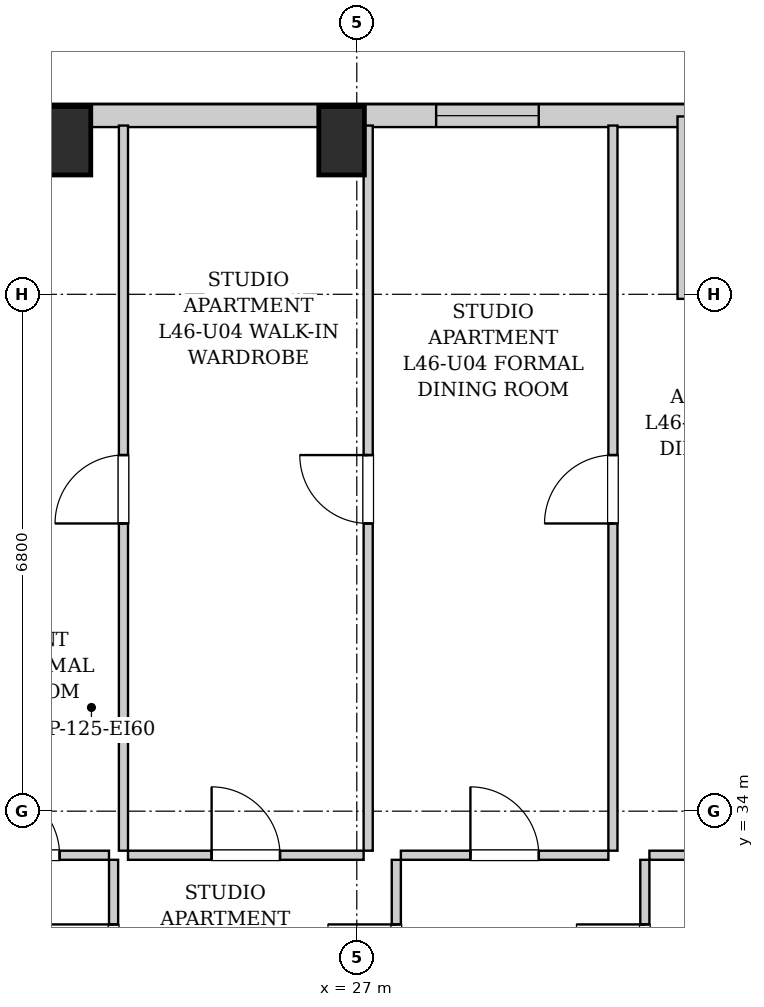
"""IFC4 building model, lengths in metres.
Left out: names, types, materials, properties, quantities, classifications, styles, units other than length and angle.
Written with IfcOpenShell. Run it as: python <this file> out.ifc"""

import sys

from ifc_helpers import new_model, si_unit, direction, frame, frame_2d, origin, origin_2d, place, context, subcontext, project, spatial, rectangle, extrude, element, fill, save


model = new_model("IFC4")
c1 = context("Model", 3, precision=1e-05, world=origin(), true_north=direction((0.0, 1.0)))
c2 = subcontext(c1, "Body", "Model", "MODEL_VIEW")
j1 = project(units=[si_unit("LENGTHUNIT", "METRE"), si_unit("PLANEANGLEUNIT", "RADIAN")], contexts=[c1])
p1 = place(None, origin())
s1 = spatial("IfcSite", under=j1, at=p1, CompositionType="ELEMENT")
p2 = place(p1, origin())
s2 = spatial("IfcBuilding", under=s1, at=p2, CompositionType="ELEMENT")
p3 = place(p2, frame((0.0, 0.0, 160.15)))
s3 = spatial("IfcBuildingStorey", under=s2, at=p3, CompositionType="ELEMENT", Elevation=160.15)
for number, where, z_axis, x_axis in (
    (1, (23.2, 42.82, 0.0), (0.0, 0.0, 1.0), (1.0, 0.0, 0.0)),
    (2, (26.8, 42.82, 0.0), (0.0, 0.0, 1.0), (1.0, 0.0, 0.0)),
):
    element("IfcColumn", number, at=place(p3, frame(where, z_axis=z_axis, x_axis=x_axis)), inside=s3, PredefinedType="COLUMN", context=c2, shape_type="SweptSolid", body=[
        extrude(rectangle(XDim=0.6, YDim=0.9, at=origin_2d()), origin(), (0.0, 0.0, 1.0), 3.25),
    ])
p4 = place(p3, frame((10.0, 43.15, 0.0), z_axis=(0.0, 0.0, 1.0), x_axis=(1.0, 0.0, 0.0)))
e3 = element("IfcWall", 3, at=p4, inside=s3, PredefinedType="SOLIDWALL", context=c2, shape_type="SweptSolid", body=[
    extrude(rectangle(XDim=21.35, YDim=0.3, at=frame_2d((10.675, 0.0))), origin(), (0.0, 0.0, 1.0), 2.99),
])
p5 = place(p4, frame((1.956, 0.0, 0.55)))
e4 = element("IfcOpeningElement", 4, at=p5, cuts=e3, PredefinedType="OPENING", context=c2, shape_type="SweptSolid", body=[
    extrude(rectangle(XDim=1.35, YDim=1.2, at=frame_2d((0.675, 0.6))), frame((0.0, 0.16, 0.0), z_axis=(0.0, -1.0, 0.0), x_axis=(1.0, 0.0, 0.0)), (0.0, 0.0, 1.0), 0.32),
])
p6 = place(p4, frame((5.189, 0.0, 0.55)))
e5 = element("IfcOpeningElement", 5, at=p6, cuts=e3, PredefinedType="OPENING", context=c2, shape_type="SweptSolid", body=[
    extrude(rectangle(XDim=1.35, YDim=1.2, at=frame_2d((0.675, 0.6))), frame((0.0, 0.16, 0.0), z_axis=(0.0, -1.0, 0.0), x_axis=(1.0, 0.0, 0.0)), (0.0, 0.0, 1.0), 0.32),
])
p7 = place(p4, frame((8.421, 0.0, 0.55)))
e6 = element("IfcOpeningElement", 6, at=p7, cuts=e3, PredefinedType="OPENING", context=c2, shape_type="SweptSolid", body=[
    extrude(rectangle(XDim=1.35, YDim=1.2, at=frame_2d((0.675, 0.6))), frame((0.0, 0.16, 0.0), z_axis=(0.0, -1.0, 0.0), x_axis=(1.0, 0.0, 0.0)), (0.0, 0.0, 1.0), 0.32),
])
p8 = place(p4, frame((11.15, 0.0, 0.55)))
e7 = element("IfcOpeningElement", 7, at=p8, cuts=e3, PredefinedType="OPENING", context=c2, shape_type="SweptSolid", body=[
    extrude(rectangle(XDim=1.35, YDim=1.2, at=frame_2d((0.675, 0.6))), frame((0.0, 0.16, 0.0), z_axis=(0.0, -1.0, 0.0), x_axis=(1.0, 0.0, 0.0)), (0.0, 0.0, 1.0), 0.32),
])
p9 = place(p4, frame((18.044, 0.0, 0.55)))
e8 = element("IfcOpeningElement", 8, at=p9, cuts=e3, PredefinedType="OPENING", context=c2, shape_type="SweptSolid", body=[
    extrude(rectangle(XDim=1.35, YDim=1.2, at=frame_2d((0.675, 0.6))), frame((0.0, 0.16, 0.0), z_axis=(0.0, -1.0, 0.0), x_axis=(1.0, 0.0, 0.0)), (0.0, 0.0, 1.0), 0.32),
])
p10 = place(p3, frame((31.35, 43.14, 0.0), z_axis=(0.0, 0.0, 1.0), x_axis=(0.0, -1.0, 0.0)))
e9 = element("IfcWall", 9, at=p10, inside=s3, PredefinedType="SOLIDWALL", context=c2, shape_type="SweptSolid", body=[
    extrude(rectangle(XDim=2.4, YDim=0.26, at=frame_2d((1.2, 0.0))), origin(), (0.0, 0.0, 1.0), 2.99),
])
p11 = place(p3, frame((23.8, 30.76, 0.0), z_axis=(0.0, 0.0, 1.0), x_axis=(0.0, 1.0, 0.0)))
e10 = element("IfcWall", 10, at=p11, inside=s3, PredefinedType="PARTITIONING", context=c2, shape_type="SweptSolid", body=[
    extrude(rectangle(XDim=2.6, YDim=0.12, at=frame_2d((1.3, 0.0))), origin(), (0.0, 0.0, 1.0), 2.99),
])
p12 = place(p11, frame((0.85, 0.0, 0.0)))
e11 = element("IfcOpeningElement", 11, at=p12, cuts=e10, PredefinedType="OPENING", context=c2, shape_type="SweptSolid", body=[
    extrude(rectangle(XDim=0.9, YDim=2.05, at=frame_2d((0.45, 1.025))), frame((0.0, 0.07, 0.0), z_axis=(0.0, -1.0, 0.0), x_axis=(1.0, 0.0, 0.0)), (0.0, 0.0, 1.0), 0.14),
])
p13 = place(p3, frame((21.54, 33.42, 0.0), z_axis=(0.0, 0.0, 1.0), x_axis=(1.0, 0.0, 0.0)))
e12 = element("IfcWall", 12, at=p13, inside=s3, PredefinedType="PARTITIONING", context=c2, shape_type="SweptSolid", body=[
    extrude(rectangle(XDim=2.2, YDim=0.12, at=frame_2d((1.1, 0.0))), origin(), (0.0, 0.0, 1.0), 2.99),
])
p14 = place(p13, frame((0.65, 0.0, 0.0)))
e13 = element("IfcOpeningElement", 13, at=p14, cuts=e12, PredefinedType="OPENING", context=c2, shape_type="SweptSolid", body=[
    extrude(rectangle(XDim=0.9, YDim=2.05, at=frame_2d((0.45, 1.025))), frame((0.0, 0.07, 0.0), z_axis=(0.0, -1.0, 0.0), x_axis=(1.0, 0.0, 0.0)), (0.0, 0.0, 1.0), 0.14),
])
p15 = place(p3, frame((27.52, 30.76, 0.0), z_axis=(0.0, 0.0, 1.0), x_axis=(0.0, 1.0, 0.0)))
e14 = element("IfcWall", 14, at=p15, inside=s3, PredefinedType="PARTITIONING", context=c2, shape_type="SweptSolid", body=[
    extrude(rectangle(XDim=2.6, YDim=0.12, at=frame_2d((1.3, 0.0))), origin(), (0.0, 0.0, 1.0), 2.99),
])
p16 = place(p15, frame((0.85, 0.0, 0.0)))
e15 = element("IfcOpeningElement", 15, at=p16, cuts=e14, PredefinedType="OPENING", context=c2, shape_type="SweptSolid", body=[
    extrude(rectangle(XDim=0.9, YDim=2.05, at=frame_2d((0.45, 1.025))), frame((0.0, 0.07, 0.0), z_axis=(0.0, -1.0, 0.0), x_axis=(1.0, 0.0, 0.0)), (0.0, 0.0, 1.0), 0.14),
])
p17 = place(p3, frame((23.99, 33.42, 0.0), z_axis=(0.0, 0.0, 1.0), x_axis=(1.0, 0.0, 0.0)))
e16 = element("IfcWall", 16, at=p17, inside=s3, PredefinedType="PARTITIONING", context=c2, shape_type="SweptSolid", body=[
    extrude(rectangle(XDim=3.1, YDim=0.12, at=frame_2d((1.55, 0.0))), origin(), (0.0, 0.0, 1.0), 2.99),
])
p18 = place(p17, frame((1.1, 0.0, 0.0)))
e17 = element("IfcOpeningElement", 17, at=p18, cuts=e16, PredefinedType="OPENING", context=c2, shape_type="SweptSolid", body=[
    extrude(rectangle(XDim=0.9, YDim=2.05, at=frame_2d((0.45, 1.025))), frame((0.0, 0.07, 0.0), z_axis=(0.0, -1.0, 0.0), x_axis=(1.0, 0.0, 0.0)), (0.0, 0.0, 1.0), 0.14),
])
p19 = place(p3, frame((30.79, 30.76, 0.0), z_axis=(0.0, 0.0, 1.0), x_axis=(0.0, 1.0, 0.0)))
e18 = element("IfcWall", 18, at=p19, inside=s3, PredefinedType="PARTITIONING", context=c2, shape_type="SweptSolid", body=[
    extrude(rectangle(XDim=2.6, YDim=0.12, at=frame_2d((1.3, 0.0))), origin(), (0.0, 0.0, 1.0), 2.99),
])
p20 = place(p19, frame((0.85, 0.0, 0.0)))
e19 = element("IfcOpeningElement", 19, at=p20, cuts=e18, PredefinedType="OPENING", context=c2, shape_type="SweptSolid", body=[
    extrude(rectangle(XDim=0.9, YDim=2.05, at=frame_2d((0.45, 1.025))), frame((0.0, 0.07, 0.0), z_axis=(0.0, -1.0, 0.0), x_axis=(1.0, 0.0, 0.0)), (0.0, 0.0, 1.0), 0.14),
])
p21 = place(p3, frame((27.58, 33.42, 0.0), z_axis=(0.0, 0.0, 1.0), x_axis=(1.0, 0.0, 0.0)))
e20 = element("IfcWall", 20, at=p21, inside=s3, PredefinedType="PARTITIONING", context=c2, shape_type="SweptSolid", body=[
    extrude(rectangle(XDim=2.73, YDim=0.12, at=frame_2d((1.365, 0.0))), origin(), (0.0, 0.0, 1.0), 2.99),
])
p22 = place(p21, frame((0.915, 0.0, 0.0)))
e21 = element("IfcOpeningElement", 21, at=p22, cuts=e20, PredefinedType="OPENING", context=c2, shape_type="SweptSolid", body=[
    extrude(rectangle(XDim=0.9, YDim=2.05, at=frame_2d((0.45, 1.025))), frame((0.0, 0.07, 0.0), z_axis=(0.0, -1.0, 0.0), x_axis=(1.0, 0.0, 0.0)), (0.0, 0.0, 1.0), 0.14),
])
p23 = place(p3, frame((30.85, 33.42, 0.0), z_axis=(0.0, 0.0, 1.0), x_axis=(1.0, 0.0, 0.0)))
e22 = element("IfcWall", 22, at=p23, inside=s3, PredefinedType="PARTITIONING", context=c2, shape_type="SweptSolid", body=[
    extrude(rectangle(XDim=2.68, YDim=0.12, at=frame_2d((1.34, 0.0))), origin(), (0.0, 0.0, 1.0), 2.99),
])
p24 = place(p23, frame((0.89, 0.0, 0.0)))
e23 = element("IfcOpeningElement", 23, at=p24, cuts=e22, PredefinedType="OPENING", context=c2, shape_type="SweptSolid", body=[
    extrude(rectangle(XDim=0.9, YDim=2.05, at=frame_2d((0.45, 1.025))), frame((0.0, 0.07, 0.0), z_axis=(0.0, -1.0, 0.0), x_axis=(1.0, 0.0, 0.0)), (0.0, 0.0, 1.0), 0.14),
])
p25 = place(p3, frame((23.93, 33.48, 0.0), z_axis=(0.0, 0.0, 1.0), x_axis=(0.0, 1.0, 0.0)))
e24 = element("IfcWall", 24, at=p25, inside=s3, PredefinedType="PARTITIONING", context=c2, shape_type="SweptSolid", body=[
    extrude(rectangle(XDim=9.54, YDim=0.12, at=frame_2d((4.77, 0.0))), origin(), (0.0, 0.0, 1.0), 2.99),
])
p26 = place(p25, frame((4.305, 0.0, 0.0)))
e25 = element("IfcOpeningElement", 25, at=p26, cuts=e24, PredefinedType="OPENING", context=c2, shape_type="SweptSolid", body=[
    extrude(rectangle(XDim=0.9, YDim=2.05, at=frame_2d((0.45, 1.025))), frame((0.0, 0.07, 0.0), z_axis=(0.0, -1.0, 0.0), x_axis=(1.0, 0.0, 0.0)), (0.0, 0.0, 1.0), 0.14),
])
p27 = place(p3, frame((27.15, 33.48, 0.0), z_axis=(0.0, 0.0, 1.0), x_axis=(0.0, 1.0, 0.0)))
e26 = element("IfcWall", 26, at=p27, inside=s3, PredefinedType="PARTITIONING", context=c2, shape_type="SweptSolid", body=[
    extrude(rectangle(XDim=9.54, YDim=0.12, at=frame_2d((4.77, 0.0))), origin(), (0.0, 0.0, 1.0), 2.99),
])
p28 = place(p27, frame((4.305, 0.0, 0.0)))
e27 = element("IfcOpeningElement", 27, at=p28, cuts=e26, PredefinedType="OPENING", context=c2, shape_type="SweptSolid", body=[
    extrude(rectangle(XDim=0.9, YDim=2.05, at=frame_2d((0.45, 1.025))), frame((0.0, 0.07, 0.0), z_axis=(0.0, -1.0, 0.0), x_axis=(1.0, 0.0, 0.0)), (0.0, 0.0, 1.0), 0.14),
])
p29 = place(p3, frame((30.37, 33.48, 0.0), z_axis=(0.0, 0.0, 1.0), x_axis=(0.0, 1.0, 0.0)))
e28 = element("IfcWall", 28, at=p29, inside=s3, PredefinedType="PARTITIONING", context=c2, shape_type="SweptSolid", body=[
    extrude(rectangle(XDim=9.54, YDim=0.12, at=frame_2d((4.77, 0.0))), origin(), (0.0, 0.0, 1.0), 2.99),
])
p30 = place(p29, frame((4.305, 0.0, 0.0)))
e29 = element("IfcOpeningElement", 29, at=p30, cuts=e28, PredefinedType="OPENING", context=c2, shape_type="SweptSolid", body=[
    extrude(rectangle(XDim=0.9, YDim=2.05, at=frame_2d((0.45, 1.025))), frame((0.0, 0.07, 0.0), z_axis=(0.0, -1.0, 0.0), x_axis=(1.0, 0.0, 0.0)), (0.0, 0.0, 1.0), 0.14),
])
p31 = place(p12, origin())
e30 = element("IfcDoor", 30, at=p31, inside=s3, OperationType="SINGLE_SWING_RIGHT", PredefinedType="DOOR", context=c2, shape_type="SweptSolid", body=[
    extrude(rectangle(XDim=0.9, YDim=2.05, at=frame_2d((0.45, 1.025))), frame((0.0, 0.025, 0.0), z_axis=(0.0, -1.0, 0.0), x_axis=(1.0, 0.0, 0.0)), (0.0, 0.0, 1.0), 0.05),
])
fill(e11, e30)
p32 = place(p14, origin())
e31 = element("IfcDoor", 31, at=p32, inside=s3, OperationType="SINGLE_SWING_LEFT", PredefinedType="DOOR", context=c2, shape_type="SweptSolid", body=[
    extrude(rectangle(XDim=0.9, YDim=2.05, at=frame_2d((0.45, 1.025))), frame((0.0, 0.025, 0.0), z_axis=(0.0, -1.0, 0.0), x_axis=(1.0, 0.0, 0.0)), (0.0, 0.0, 1.0), 0.05),
])
fill(e13, e31)
p33 = place(p16, origin())
e32 = element("IfcDoor", 32, at=p33, inside=s3, OperationType="SINGLE_SWING_RIGHT", PredefinedType="DOOR", context=c2, shape_type="SweptSolid", body=[
    extrude(rectangle(XDim=0.9, YDim=2.05, at=frame_2d((0.45, 1.025))), frame((0.0, 0.025, 0.0), z_axis=(0.0, -1.0, 0.0), x_axis=(1.0, 0.0, 0.0)), (0.0, 0.0, 1.0), 0.05),
])
fill(e15, e32)
p34 = place(p18, origin())
e33 = element("IfcDoor", 33, at=p34, inside=s3, OperationType="SINGLE_SWING_LEFT", PredefinedType="DOOR", context=c2, shape_type="SweptSolid", body=[
    extrude(rectangle(XDim=0.9, YDim=2.05, at=frame_2d((0.45, 1.025))), frame((0.0, 0.025, 0.0), z_axis=(0.0, -1.0, 0.0), x_axis=(1.0, 0.0, 0.0)), (0.0, 0.0, 1.0), 0.05),
])
fill(e17, e33)
p35 = place(p20, origin())
e34 = element("IfcDoor", 34, at=p35, inside=s3, OperationType="SINGLE_SWING_RIGHT", PredefinedType="DOOR", context=c2, shape_type="SweptSolid", body=[
    extrude(rectangle(XDim=0.9, YDim=2.05, at=frame_2d((0.45, 1.025))), frame((0.0, 0.025, 0.0), z_axis=(0.0, -1.0, 0.0), x_axis=(1.0, 0.0, 0.0)), (0.0, 0.0, 1.0), 0.05),
])
fill(e19, e34)
p36 = place(p22, origin())
e35 = element("IfcDoor", 35, at=p36, inside=s3, OperationType="SINGLE_SWING_LEFT", PredefinedType="DOOR", context=c2, shape_type="SweptSolid", body=[
    extrude(rectangle(XDim=0.9, YDim=2.05, at=frame_2d((0.45, 1.025))), frame((0.0, 0.025, 0.0), z_axis=(0.0, -1.0, 0.0), x_axis=(1.0, 0.0, 0.0)), (0.0, 0.0, 1.0), 0.05),
])
fill(e21, e35)
p37 = place(p26, origin())
e36 = element("IfcDoor", 36, at=p37, inside=s3, OperationType="SINGLE_SWING_LEFT", PredefinedType="DOOR", context=c2, shape_type="SweptSolid", body=[
    extrude(rectangle(XDim=0.9, YDim=2.05, at=frame_2d((0.45, 1.025))), frame((0.0, 0.025, 0.0), z_axis=(0.0, -1.0, 0.0), x_axis=(1.0, 0.0, 0.0)), (0.0, 0.0, 1.0), 0.05),
])
fill(e25, e36)
p38 = place(p28, origin())
e37 = element("IfcDoor", 37, at=p38, inside=s3, OperationType="SINGLE_SWING_RIGHT", PredefinedType="DOOR", context=c2, shape_type="SweptSolid", body=[
    extrude(rectangle(XDim=0.9, YDim=2.05, at=frame_2d((0.45, 1.025))), frame((0.0, 0.025, 0.0), z_axis=(0.0, -1.0, 0.0), x_axis=(1.0, 0.0, 0.0)), (0.0, 0.0, 1.0), 0.05),
])
fill(e27, e37)
p39 = place(p30, origin())
e38 = element("IfcDoor", 38, at=p39, inside=s3, OperationType="SINGLE_SWING_LEFT", PredefinedType="DOOR", context=c2, shape_type="SweptSolid", body=[
    extrude(rectangle(XDim=0.9, YDim=2.05, at=frame_2d((0.45, 1.025))), frame((0.0, 0.025, 0.0), z_axis=(0.0, -1.0, 0.0), x_axis=(1.0, 0.0, 0.0)), (0.0, 0.0, 1.0), 0.05),
])
fill(e29, e38)
p40 = place(p9, origin())
e39 = element("IfcWindow", 39, at=p40, inside=s3, PartitioningType="SINGLE_PANEL", PredefinedType="WINDOW", context=c2, shape_type="SweptSolid", body=[
    extrude(rectangle(XDim=1.35, YDim=1.2, at=frame_2d((0.675, 0.6))), frame((0.0, 0.03, 0.0), z_axis=(0.0, -1.0, 0.0), x_axis=(1.0, 0.0, 0.0)), (0.0, 0.0, 1.0), 0.06),
])
fill(e8, e39)
save(model, sys.argv[1])
